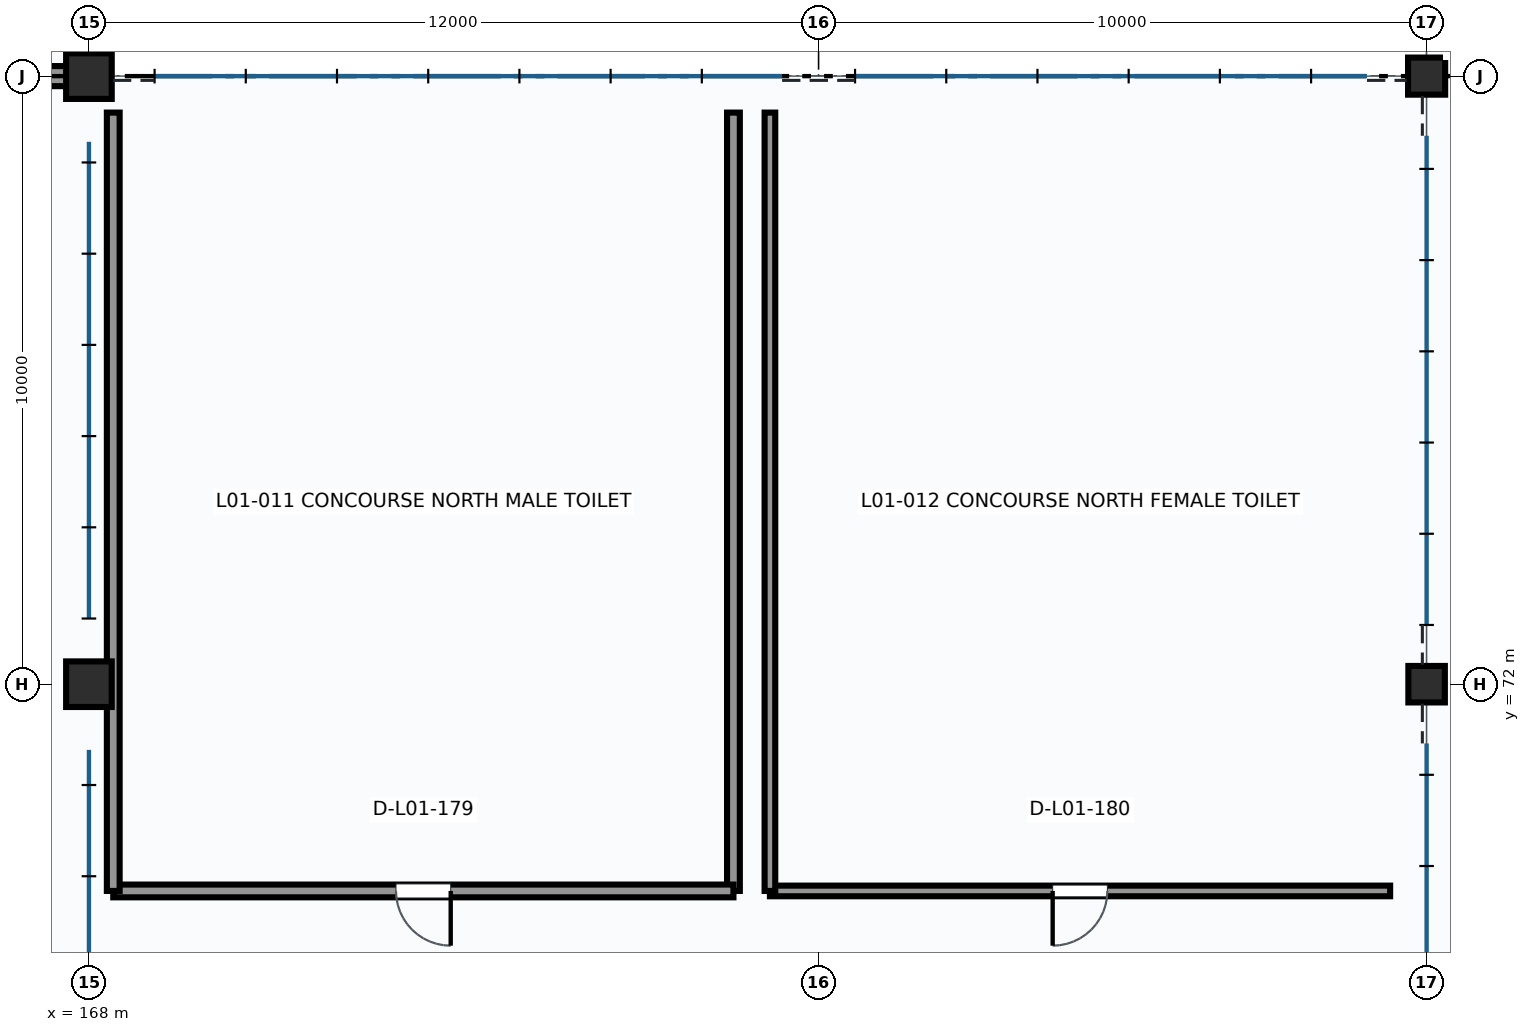
"""IFC4 building model, lengths in metres.
Left out: names, types, materials, properties, quantities, classifications, styles, units other than length and angle.
Written with IfcOpenShell. Run it as: python <this file> out.ifc"""

import sys

from ifc_helpers import new_model, si_unit, direction, frame, frame_2d, origin, origin_2d, place, context, subcontext, project, spatial, rectangle, hollow_circle, extrude, element, fill, save


model = new_model("IFC4")
c1 = context("Model", 3, precision=1e-05, world=origin(), true_north=direction((0.0, 1.0)))
c2 = subcontext(c1, "Body", "Model", "MODEL_VIEW")
j1 = project(units=[si_unit("LENGTHUNIT", "METRE"), si_unit("PLANEANGLEUNIT", "RADIAN")], contexts=[c1])
p1 = place(None, origin())
s1 = spatial("IfcSite", under=j1, at=p1, CompositionType="ELEMENT")
p2 = place(p1, origin())
s2 = spatial("IfcBuilding", under=s1, at=p2, CompositionType="ELEMENT")
p3 = place(p2, frame((0.0, 0.0, 5.4)))
s3 = spatial("IfcBuildingStorey", under=s2, at=p3, CompositionType="ELEMENT", Elevation=5.4)
for number, where, z_axis, x_axis in (
    (1, (168.0, 72.0, 0.0), (0.0, 0.0, 1.0), (1.0, 0.0, 0.0)),
    (2, (168.0, 82.0, 0.0), (0.0, 0.0, 1.0), (1.0, 0.0, 0.0)),
):
    element("IfcColumn", number, at=place(p3, frame(where, z_axis=z_axis, x_axis=x_axis)), inside=s3, PredefinedType="COLUMN", context=c2, shape_type="SweptSolid", body=[
        extrude(rectangle(XDim=0.75, YDim=0.75, at=origin_2d()), origin(), (0.0, 0.0, 1.0), 4.8),
    ])
p4 = place(p3, frame((190.0, 72.0, 0.0), z_axis=(0.0, 0.0, 1.0), x_axis=(1.0, 0.0, 0.0)))
e3 = element("IfcColumn", 3, at=p4, inside=s3, PredefinedType="COLUMN", context=c2, shape_type="SweptSolid", body=[
    extrude(rectangle(XDim=0.6, YDim=0.6, at=origin_2d()), origin(), (0.0, 0.0, 1.0), 2.0),
])
p5 = place(p3, frame((190.0, 82.0, 0.0), z_axis=(0.0, 0.0, 1.0), x_axis=(1.0, 0.0, 0.0)))
e4 = element("IfcColumn", 4, at=p5, inside=s3, PredefinedType="COLUMN", context=c2, shape_type="SweptSolid", body=[
    extrude(hollow_circle(Radius=0.305, WallThickness=0.025, at=origin_2d()), origin(), (0.0, 0.0, 1.0), 2.0),
])
p6 = place(p3, frame((156.535, 82.0, 0.0), z_axis=(0.0, 0.0, 1.0), x_axis=(1.0, 0.0, 0.0)))
e5 = element("IfcWall", 5, at=p6, inside=s3, PredefinedType="SOLIDWALL", context=c2, shape_type="SweptSolid", body=[
    extrude(rectangle(XDim=11.105, YDim=0.33, at=frame_2d((5.552, 0.0))), origin(), (0.0, 0.0, 1.0), 3.523),
])
p7 = place(p6, frame((2.009, 0.0, 0.9)))
e6 = element("IfcOpeningElement", 6, at=p7, cuts=e5, PredefinedType="OPENING", context=c2, shape_type="SweptSolid", body=[
    extrude(rectangle(XDim=2.2, YDim=1.6, at=frame_2d((1.1, 0.8))), frame((0.0, 0.175, 0.0), z_axis=(0.0, -1.0, 0.0), x_axis=(1.0, 0.0, 0.0)), (0.0, 0.0, 1.0), 0.35),
])
p8 = place(p6, frame((6.696, 0.0, 0.9)))
e7 = element("IfcOpeningElement", 7, at=p8, cuts=e5, PredefinedType="OPENING", context=c2, shape_type="SweptSolid", body=[
    extrude(rectangle(XDim=2.6, YDim=1.6, at=frame_2d((1.3, 0.8))), frame((0.0, 0.175, 0.0), z_axis=(0.0, -1.0, 0.0), x_axis=(1.0, 0.0, 0.0)), (0.0, 0.0, 1.0), 0.35),
])
p9 = place(p3, frame((178.6, 81.4, 0.0), z_axis=(0.0, 0.0, 1.0), x_axis=(0.0, -1.0, 0.0)))
e8 = element("IfcWall", 8, at=p9, inside=s3, PredefinedType="SOLIDWALL", context=c2, shape_type="SweptSolid", body=[
    extrude(rectangle(XDim=12.8, YDim=0.21, at=frame_2d((6.4, 0.0))), origin(), (0.0, 0.0, 1.0), 4.47),
])
p10 = place(p3, frame((178.6, 68.6, 0.0), z_axis=(0.0, 0.0, 1.0), x_axis=(-1.0, 0.0, 0.0)))
e9 = element("IfcWall", 9, at=p10, inside=s3, PredefinedType="SOLIDWALL", context=c2, shape_type="SweptSolid", body=[
    extrude(rectangle(XDim=10.2, YDim=0.21, at=frame_2d((5.1, 0.0))), origin(), (0.0, 0.0, 1.0), 4.47),
])
p11 = place(p10, frame((4.65, 0.0, 0.0)))
e10 = element("IfcOpeningElement", 10, at=p11, cuts=e9, PredefinedType="OPENING", context=c2, shape_type="SweptSolid", body=[
    extrude(rectangle(XDim=0.9, YDim=2.1, at=frame_2d((0.45, 1.05))), frame((0.0, 0.115, 0.0), z_axis=(0.0, -1.0, 0.0), x_axis=(1.0, 0.0, 0.0)), (0.0, 0.0, 1.0), 0.23),
])
p12 = place(p3, frame((168.4, 68.6, 0.0), z_axis=(0.0, 0.0, 1.0), x_axis=(0.0, 1.0, 0.0)))
e11 = element("IfcWall", 11, at=p12, inside=s3, PredefinedType="SOLIDWALL", context=c2, shape_type="SweptSolid", body=[
    extrude(rectangle(XDim=12.8, YDim=0.21, at=frame_2d((6.4, 0.0))), origin(), (0.0, 0.0, 1.0), 4.47),
])
p13 = place(p3, frame((189.4, 68.6, 0.0), z_axis=(0.0, 0.0, 1.0), x_axis=(-1.0, 0.0, 0.0)))
e12 = element("IfcWall", 12, at=p13, inside=s3, PredefinedType="PARTITIONING", context=c2, shape_type="SweptSolid", body=[
    extrude(rectangle(XDim=10.2, YDim=0.175, at=frame_2d((5.1, 0.0))), origin(), (0.0, 0.0, 1.0), 4.47),
])
p14 = place(p13, frame((4.65, 0.0, 0.0)))
e13 = element("IfcOpeningElement", 13, at=p14, cuts=e12, PredefinedType="OPENING", context=c2, shape_type="SweptSolid", body=[
    extrude(rectangle(XDim=0.9, YDim=2.1, at=frame_2d((0.45, 1.05))), frame((0.0, 0.097, 0.0), z_axis=(0.0, -1.0, 0.0), x_axis=(1.0, 0.0, 0.0)), (0.0, 0.0, 1.0), 0.195),
])
p15 = place(p3, frame((179.2, 68.6, 0.0), z_axis=(0.0, 0.0, 1.0), x_axis=(0.0, 1.0, 0.0)))
e14 = element("IfcWall", 14, at=p15, inside=s3, PredefinedType="PARTITIONING", context=c2, shape_type="SweptSolid", body=[
    extrude(rectangle(XDim=12.8, YDim=0.175, at=frame_2d((6.4, 0.0))), origin(), (0.0, 0.0, 1.0), 4.47),
])
p16 = place(p11, origin())
e15 = element("IfcDoor", 15, at=p16, inside=s3, OperationType="SINGLE_SWING_LEFT", PredefinedType="DOOR", context=c2, shape_type="SweptSolid", body=[
    extrude(rectangle(XDim=0.9, YDim=2.1, at=frame_2d((0.45, 1.05))), frame((0.0, 0.025, 0.0), z_axis=(0.0, -1.0, 0.0), x_axis=(1.0, 0.0, 0.0)), (0.0, 0.0, 1.0), 0.05),
])
fill(e10, e15)
p17 = place(p14, origin())
e16 = element("IfcDoor", 16, at=p17, inside=s3, OperationType="SINGLE_SWING_RIGHT", PredefinedType="DOOR", context=c2, shape_type="SweptSolid", body=[
    extrude(rectangle(XDim=0.9, YDim=2.1, at=frame_2d((0.45, 1.05))), frame((0.0, 0.025, 0.0), z_axis=(0.0, -1.0, 0.0), x_axis=(1.0, 0.0, 0.0)), (0.0, 0.0, 1.0), 0.05),
])
fill(e13, e16)
save(model, sys.argv[1])
